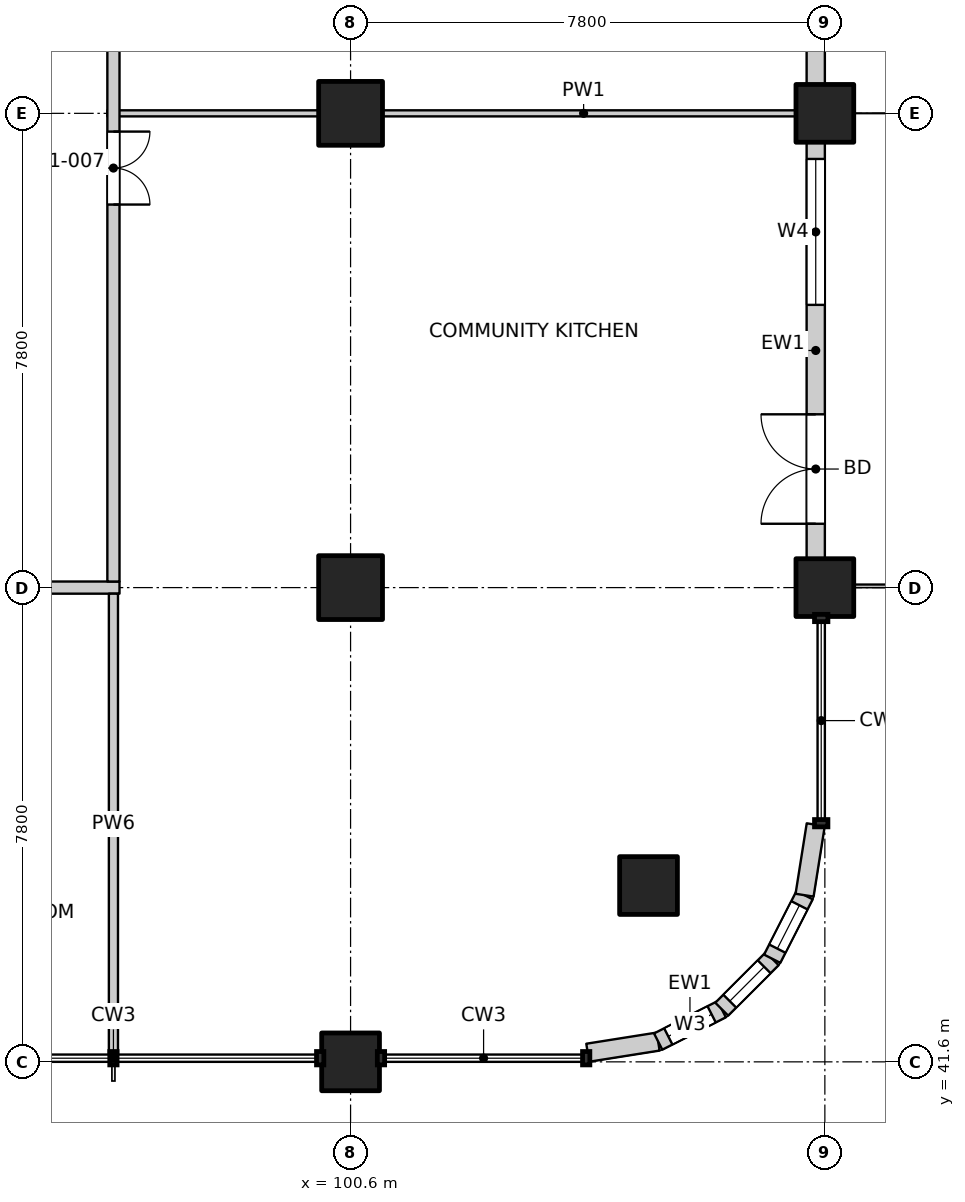
"""IFC4 building model, lengths in metres.
Left out: names, types, materials, properties, quantities, classifications, styles, units other than length and angle.
Written with IfcOpenShell. Run it as: python <this file> out.ifc"""

import sys

from ifc_helpers import new_model, si_unit, direction, frame, frame_2d, origin, origin_2d, place, context, subcontext, project, spatial, rectangle, extrude, element, fill, save


model = new_model("IFC4")
c1 = context("Model", 3, precision=1e-05, world=origin(), true_north=direction((0.0, 1.0)))
c2 = subcontext(c1, "Body", "Model", "MODEL_VIEW")
j1 = project(units=[si_unit("LENGTHUNIT", "METRE"), si_unit("PLANEANGLEUNIT", "RADIAN")], contexts=[c1])
p1 = place(None, origin())
s1 = spatial("IfcSite", under=j1, at=p1, CompositionType="ELEMENT")
p2 = place(p1, origin())
s2 = spatial("IfcBuilding", under=s1, at=p2, CompositionType="ELEMENT")
p3 = place(p2, frame((0.0, 0.0, 71.6)))
s3 = spatial("IfcBuildingStorey", under=s2, at=p3, CompositionType="ELEMENT", Elevation=71.6)
for number, where, z_axis, x_axis in (
    (1, (105.5, 44.5, -0.25), (0.0, 0.0, 1.0), (1.0, 0.0, 0.0)),
    (2, (108.4, 49.4, -0.25), (0.0, 0.0, 1.0), (1.0, 0.0, 0.0)),
    (3, (108.4, 57.2, -0.25), (0.0, 0.0, 1.0), (1.0, 0.0, 0.0)),
    (4, (100.6, 41.6, -0.25), (0.0, 0.0, 1.0), (1.0, 0.0, 0.0)),
):
    element("IfcColumn", number, at=place(p3, frame(where, z_axis=z_axis, x_axis=x_axis)), inside=s3, PredefinedType="COLUMN", context=c2, shape_type="SweptSolid", body=[
        extrude(rectangle(XDim=0.95, YDim=0.95, at=origin_2d()), origin(), (0.0, 0.0, 1.0), 3.4),
    ])
for number, where, z_axis, x_axis in (
    (5, (100.6, 49.4, -0.25), (0.0, 0.0, 1.0), (1.0, 0.0, 0.0)),
    (6, (100.6, 57.2, -0.25), (0.0, 0.0, 1.0), (1.0, 0.0, 0.0)),
):
    element("IfcColumn", number, at=place(p3, frame(where, z_axis=z_axis, x_axis=x_axis)), inside=s3, PredefinedType="COLUMN", context=c2, shape_type="SweptSolid", body=[
        extrude(rectangle(XDim=1.05, YDim=1.05, at=origin_2d()), origin(), (0.0, 0.0, 1.0), 3.4),
    ])
p4 = place(p3, frame((108.25, 49.875, 0.0), z_axis=(0.0, 0.0, 1.0), x_axis=(0.0, 1.0, 0.0)))
e7 = element("IfcWall", 7, at=p4, inside=s3, PredefinedType="SOLIDWALL", context=c2, shape_type="SweptSolid", body=[
    extrude(rectangle(XDim=6.85, YDim=0.3, at=frame_2d((3.425, 0.0))), origin(), (0.0, 0.0, 1.0), 2.7),
])
p5 = place(p4, frame((0.575, 0.0, 0.0)))
e8 = element("IfcOpeningElement", 8, at=p5, cuts=e7, PredefinedType="OPENING", context=c2, shape_type="SweptSolid", body=[
    extrude(rectangle(XDim=1.8, YDim=2.4, at=frame_2d((0.9, 1.2))), frame((0.0, 0.16, 0.0), z_axis=(0.0, -1.0, 0.0), x_axis=(1.0, 0.0, 0.0)), (0.0, 0.0, 1.0), 0.32),
])
p6 = place(p4, frame((4.175, 0.0, 0.6)))
e9 = element("IfcOpeningElement", 9, at=p6, cuts=e7, PredefinedType="OPENING", context=c2, shape_type="SweptSolid", body=[
    extrude(rectangle(XDim=2.4, YDim=2.1, at=frame_2d((1.2, 1.05))), frame((0.0, 0.16, 0.0), z_axis=(0.0, -1.0, 0.0), x_axis=(1.0, 0.0, 0.0)), (0.0, 0.0, 1.0), 0.32),
])
p7 = place(p3, frame((108.25, 57.675, 0.0), z_axis=(0.0, 0.0, 1.0), x_axis=(0.0, 1.0, 0.0)))
e10 = element("IfcWall", 10, at=p7, inside=s3, PredefinedType="SOLIDWALL", context=c2, shape_type="SweptSolid", body=[
    extrude(rectangle(XDim=6.85, YDim=0.3, at=frame_2d((3.425, 0.0))), origin(), (0.0, 0.0, 1.0), 2.7),
])
p8 = place(p7, frame((0.575, 0.0, 0.0)))
e11 = element("IfcOpeningElement", 11, at=p8, cuts=e10, PredefinedType="OPENING", context=c2, shape_type="SweptSolid", body=[
    extrude(rectangle(XDim=1.8, YDim=2.4, at=frame_2d((0.9, 1.2))), frame((0.0, 0.16, 0.0), z_axis=(0.0, -1.0, 0.0), x_axis=(1.0, 0.0, 0.0)), (0.0, 0.0, 1.0), 0.32),
])
p9 = place(p7, frame((4.175, 0.0, 0.6)))
e12 = element("IfcOpeningElement", 12, at=p9, cuts=e10, PredefinedType="OPENING", context=c2, shape_type="SweptSolid", body=[
    extrude(rectangle(XDim=2.4, YDim=2.1, at=frame_2d((1.2, 1.05))), frame((0.0, 0.16, 0.0), z_axis=(0.0, -1.0, 0.0), x_axis=(1.0, 0.0, 0.0)), (0.0, 0.0, 1.0), 0.32),
])
p10 = place(p3, frame((104.5, 41.75, 0.0), z_axis=(0.0, 0.0, 1.0), x_axis=(0.987678452879, 0.156496880861, 0.0)))
e13 = element("IfcWall", 13, at=p10, inside=s3, PredefinedType="SOLIDWALL", context=c2, shape_type="SweptSolid", body=[
    extrude(rectangle(XDim=1.173, YDim=0.3, at=frame_2d((0.586, 0.0))), origin(), (0.0, 0.0, 1.0), 2.7),
])
p11 = place(p3, frame((105.659, 41.934, 0.0), z_axis=(0.0, 0.0, 1.0), x_axis=(0.890988677504, 0.454025524128, 0.0)))
e14 = element("IfcWall", 14, at=p11, inside=s3, PredefinedType="SOLIDWALL", context=c2, shape_type="SweptSolid", body=[
    extrude(rectangle(XDim=1.173, YDim=0.3, at=frame_2d((0.587, 0.0))), origin(), (0.0, 0.0, 1.0), 2.7),
])
p12 = place(p11, frame((0.187, 0.0, 0.9)))
e15 = element("IfcOpeningElement", 15, at=p12, cuts=e14, PredefinedType="OPENING", context=c2, shape_type="SweptSolid", body=[
    extrude(rectangle(XDim=0.8, YDim=1.2, at=frame_2d((0.4, 0.6))), frame((0.0, 0.16, 0.0), z_axis=(0.0, -1.0, 0.0), x_axis=(1.0, 0.0, 0.0)), (0.0, 0.0, 1.0), 0.32),
])
p13 = place(p3, frame((106.704, 42.466, 0.0), z_axis=(0.0, 0.0, 1.0), x_axis=(0.707106781187, 0.707106781187, 0.0)))
e16 = element("IfcWall", 16, at=p13, inside=s3, PredefinedType="SOLIDWALL", context=c2, shape_type="SweptSolid", body=[
    extrude(rectangle(XDim=1.173, YDim=0.3, at=frame_2d((0.586, 0.0))), origin(), (0.0, 0.0, 1.0), 2.7),
])
p14 = place(p13, frame((0.187, 0.0, 0.9)))
e17 = element("IfcOpeningElement", 17, at=p14, cuts=e16, PredefinedType="OPENING", context=c2, shape_type="SweptSolid", body=[
    extrude(rectangle(XDim=0.8, YDim=1.2, at=frame_2d((0.4, 0.6))), frame((0.0, 0.16, 0.0), z_axis=(0.0, -1.0, 0.0), x_axis=(1.0, 0.0, 0.0)), (0.0, 0.0, 1.0), 0.32),
])
p15 = place(p3, frame((107.534, 43.296, 0.0), z_axis=(0.0, 0.0, 1.0), x_axis=(0.454025524128, 0.890988677504, 0.0)))
e18 = element("IfcWall", 18, at=p15, inside=s3, PredefinedType="SOLIDWALL", context=c2, shape_type="SweptSolid", body=[
    extrude(rectangle(XDim=1.173, YDim=0.3, at=frame_2d((0.587, 0.0))), origin(), (0.0, 0.0, 1.0), 2.7),
])
p16 = place(p15, frame((0.187, 0.0, 0.9)))
e19 = element("IfcOpeningElement", 19, at=p16, cuts=e18, PredefinedType="OPENING", context=c2, shape_type="SweptSolid", body=[
    extrude(rectangle(XDim=0.8, YDim=1.2, at=frame_2d((0.4, 0.6))), frame((0.0, 0.16, 0.0), z_axis=(0.0, -1.0, 0.0), x_axis=(1.0, 0.0, 0.0)), (0.0, 0.0, 1.0), 0.32),
])
p17 = place(p3, frame((108.066, 44.341, 0.0), z_axis=(0.0, 0.0, 1.0), x_axis=(0.156496880861, 0.987678452879, 0.0)))
e20 = element("IfcWall", 20, at=p17, inside=s3, PredefinedType="SOLIDWALL", context=c2, shape_type="SweptSolid", body=[
    extrude(rectangle(XDim=1.173, YDim=0.3, at=frame_2d((0.586, 0.0))), origin(), (0.0, 0.0, 1.0), 2.7),
])
p18 = place(p3, frame((73.2, 49.4, 0.0), z_axis=(0.0, 0.0, 1.0), x_axis=(1.0, 0.0, 0.0)))
e21 = element("IfcWall", 21, at=p18, inside=s3, PredefinedType="PARTITIONING", context=c2, shape_type="SweptSolid", body=[
    extrude(rectangle(XDim=23.6, YDim=0.2, at=frame_2d((11.8, 0.0))), origin(), (0.0, 0.0, 1.0), 3.15),
])
p19 = place(p18, frame((5.35, 0.0, 0.0)))
e22 = element("IfcOpeningElement", 22, at=p19, cuts=e21, PredefinedType="OPENING", context=c2, shape_type="SweptSolid", body=[
    extrude(rectangle(XDim=1.2, YDim=2.1, at=frame_2d((0.6, 1.05))), frame((0.0, 0.11, 0.0), z_axis=(0.0, -1.0, 0.0), x_axis=(1.0, 0.0, 0.0)), (0.0, 0.0, 1.0), 0.22),
])
p20 = place(p18, frame((15.1, 0.0, 0.0)))
e23 = element("IfcOpeningElement", 23, at=p20, cuts=e21, PredefinedType="OPENING", context=c2, shape_type="SweptSolid", body=[
    extrude(rectangle(XDim=1.2, YDim=2.1, at=frame_2d((0.6, 1.05))), frame((0.0, 0.11, 0.0), z_axis=(0.0, -1.0, 0.0), x_axis=(1.0, 0.0, 0.0)), (0.0, 0.0, 1.0), 0.22),
])
p21 = place(p18, frame((21.1, 0.0, 0.0)))
e24 = element("IfcOpeningElement", 24, at=p21, cuts=e21, PredefinedType="OPENING", context=c2, shape_type="SweptSolid", body=[
    extrude(rectangle(XDim=0.9, YDim=2.1, at=frame_2d((0.45, 1.05))), frame((0.0, 0.11, 0.0), z_axis=(0.0, -1.0, 0.0), x_axis=(1.0, 0.0, 0.0)), (0.0, 0.0, 1.0), 0.22),
])
p22 = place(p3, frame((96.6, 57.2, 0.0), z_axis=(0.0, 0.0, 1.0), x_axis=(1.0, 0.0, 0.0)))
e25 = element("IfcWall", 25, at=p22, inside=s3, PredefinedType="PARTITIONING", context=c2, shape_type="SweptSolid", body=[
    extrude(rectangle(XDim=4.0, YDim=0.1, at=frame_2d((2.0, 0.0))), origin(), (0.0, 0.0, 1.0), 3.15),
])
p23 = place(p3, frame((100.6, 57.2, 0.0), z_axis=(0.0, 0.0, 1.0), x_axis=(1.0, 0.0, 0.0)))
e26 = element("IfcWall", 26, at=p23, inside=s3, PredefinedType="PARTITIONING", context=c2, shape_type="SweptSolid", body=[
    extrude(rectangle(XDim=7.665, YDim=0.1, at=frame_2d((3.833, 0.0))), origin(), (0.0, 0.0, 1.0), 2.55),
])
p24 = place(p3, frame((96.7, 41.735, 0.0), z_axis=(0.0, 0.0, 1.0), x_axis=(0.0, 1.0, 0.0)))
e27 = element("IfcWall", 27, at=p24, inside=s3, PredefinedType="PARTITIONING", context=c2, shape_type="SweptSolid", body=[
    extrude(rectangle(XDim=7.565, YDim=0.15, at=frame_2d((3.782, 0.0))), origin(), (0.0, 0.0, 1.0), 3.15),
])
p25 = place(p3, frame((96.7, 49.5, 0.0), z_axis=(0.0, 0.0, 1.0), x_axis=(0.0, 1.0, 0.0)))
e28 = element("IfcWall", 28, at=p25, inside=s3, PredefinedType="PARTITIONING", context=c2, shape_type="SweptSolid", body=[
    extrude(rectangle(XDim=34.9, YDim=0.2, at=frame_2d((17.45, 0.0))), origin(), (0.0, 0.0, 1.0), 3.15),
])
p26 = place(p25, frame((6.2, 0.0, 0.0)))
e29 = element("IfcOpeningElement", 29, at=p26, cuts=e28, PredefinedType="OPENING", context=c2, shape_type="SweptSolid", body=[
    extrude(rectangle(XDim=1.2, YDim=2.1, at=frame_2d((0.6, 1.05))), frame((0.0, 0.11, 0.0), z_axis=(0.0, -1.0, 0.0), x_axis=(1.0, 0.0, 0.0)), (0.0, 0.0, 1.0), 0.22),
])
p27 = place(p25, frame((12.95, 0.0, 0.0)))
e30 = element("IfcOpeningElement", 30, at=p27, cuts=e28, PredefinedType="OPENING", context=c2, shape_type="SweptSolid", body=[
    extrude(rectangle(XDim=1.2, YDim=2.1, at=frame_2d((0.6, 1.05))), frame((0.0, 0.11, 0.0), z_axis=(0.0, -1.0, 0.0), x_axis=(1.0, 0.0, 0.0)), (0.0, 0.0, 1.0), 0.22),
])
p28 = place(p25, frame((20.75, 0.0, 0.0)))
e31 = element("IfcOpeningElement", 31, at=p28, cuts=e28, PredefinedType="OPENING", context=c2, shape_type="SweptSolid", body=[
    extrude(rectangle(XDim=1.2, YDim=2.1, at=frame_2d((0.6, 1.05))), frame((0.0, 0.11, 0.0), z_axis=(0.0, -1.0, 0.0), x_axis=(1.0, 0.0, 0.0)), (0.0, 0.0, 1.0), 0.22),
])
p29 = place(p25, frame((28.55, 0.0, 0.0)))
e32 = element("IfcOpeningElement", 32, at=p29, cuts=e28, PredefinedType="OPENING", context=c2, shape_type="SweptSolid", body=[
    extrude(rectangle(XDim=1.2, YDim=2.1, at=frame_2d((0.6, 1.05))), frame((0.0, 0.11, 0.0), z_axis=(0.0, -1.0, 0.0), x_axis=(1.0, 0.0, 0.0)), (0.0, 0.0, 1.0), 0.22),
])
p30 = place(p5, origin())
e33 = element("IfcDoor", 33, at=p30, inside=s3, OperationType="DOUBLE_DOOR_SINGLE_SWING", PredefinedType="DOOR", context=c2, shape_type="SweptSolid", body=[
    extrude(rectangle(XDim=1.8, YDim=2.4, at=frame_2d((0.9, 1.2))), frame((0.0, 0.025, 0.0), z_axis=(0.0, -1.0, 0.0), x_axis=(1.0, 0.0, 0.0)), (0.0, 0.0, 1.0), 0.05),
])
fill(e8, e33)
p31 = place(p6, origin())
e34 = element("IfcWindow", 34, at=p31, inside=s3, PartitioningType="SINGLE_PANEL", PredefinedType="WINDOW", context=c2, shape_type="SweptSolid", body=[
    extrude(rectangle(XDim=2.4, YDim=2.1, at=frame_2d((1.2, 1.05))), frame((0.0, 0.03, 0.0), z_axis=(0.0, -1.0, 0.0), x_axis=(1.0, 0.0, 0.0)), (0.0, 0.0, 1.0), 0.06),
])
fill(e9, e34)
p32 = place(p12, origin())
e35 = element("IfcWindow", 35, at=p32, inside=s3, PartitioningType="SINGLE_PANEL", PredefinedType="WINDOW", context=c2, shape_type="SweptSolid", body=[
    extrude(rectangle(XDim=0.8, YDim=1.2, at=frame_2d((0.4, 0.6))), frame((0.0, 0.03, 0.0), z_axis=(0.0, -1.0, 0.0), x_axis=(1.0, 0.0, 0.0)), (0.0, 0.0, 1.0), 0.06),
])
fill(e15, e35)
p33 = place(p14, origin())
e36 = element("IfcWindow", 36, at=p33, inside=s3, PartitioningType="SINGLE_PANEL", PredefinedType="WINDOW", context=c2, shape_type="SweptSolid", body=[
    extrude(rectangle(XDim=0.8, YDim=1.2, at=frame_2d((0.4, 0.6))), frame((0.0, 0.03, 0.0), z_axis=(0.0, -1.0, 0.0), x_axis=(1.0, 0.0, 0.0)), (0.0, 0.0, 1.0), 0.06),
])
fill(e17, e36)
p34 = place(p16, origin())
e37 = element("IfcWindow", 37, at=p34, inside=s3, PartitioningType="SINGLE_PANEL", PredefinedType="WINDOW", context=c2, shape_type="SweptSolid", body=[
    extrude(rectangle(XDim=0.8, YDim=1.2, at=frame_2d((0.4, 0.6))), frame((0.0, 0.03, 0.0), z_axis=(0.0, -1.0, 0.0), x_axis=(1.0, 0.0, 0.0)), (0.0, 0.0, 1.0), 0.06),
])
fill(e19, e37)
p35 = place(p26, origin())
e38 = element("IfcDoor", 38, at=p35, inside=s3, OperationType="DOUBLE_DOOR_SINGLE_SWING", PredefinedType="DOOR", context=c2, shape_type="SweptSolid", body=[
    extrude(rectangle(XDim=1.2, YDim=2.1, at=frame_2d((0.6, 1.05))), frame((0.0, 0.025, 0.0), z_axis=(0.0, -1.0, 0.0), x_axis=(1.0, 0.0, 0.0)), (0.0, 0.0, 1.0), 0.05),
])
fill(e29, e38)
save(model, sys.argv[1])
